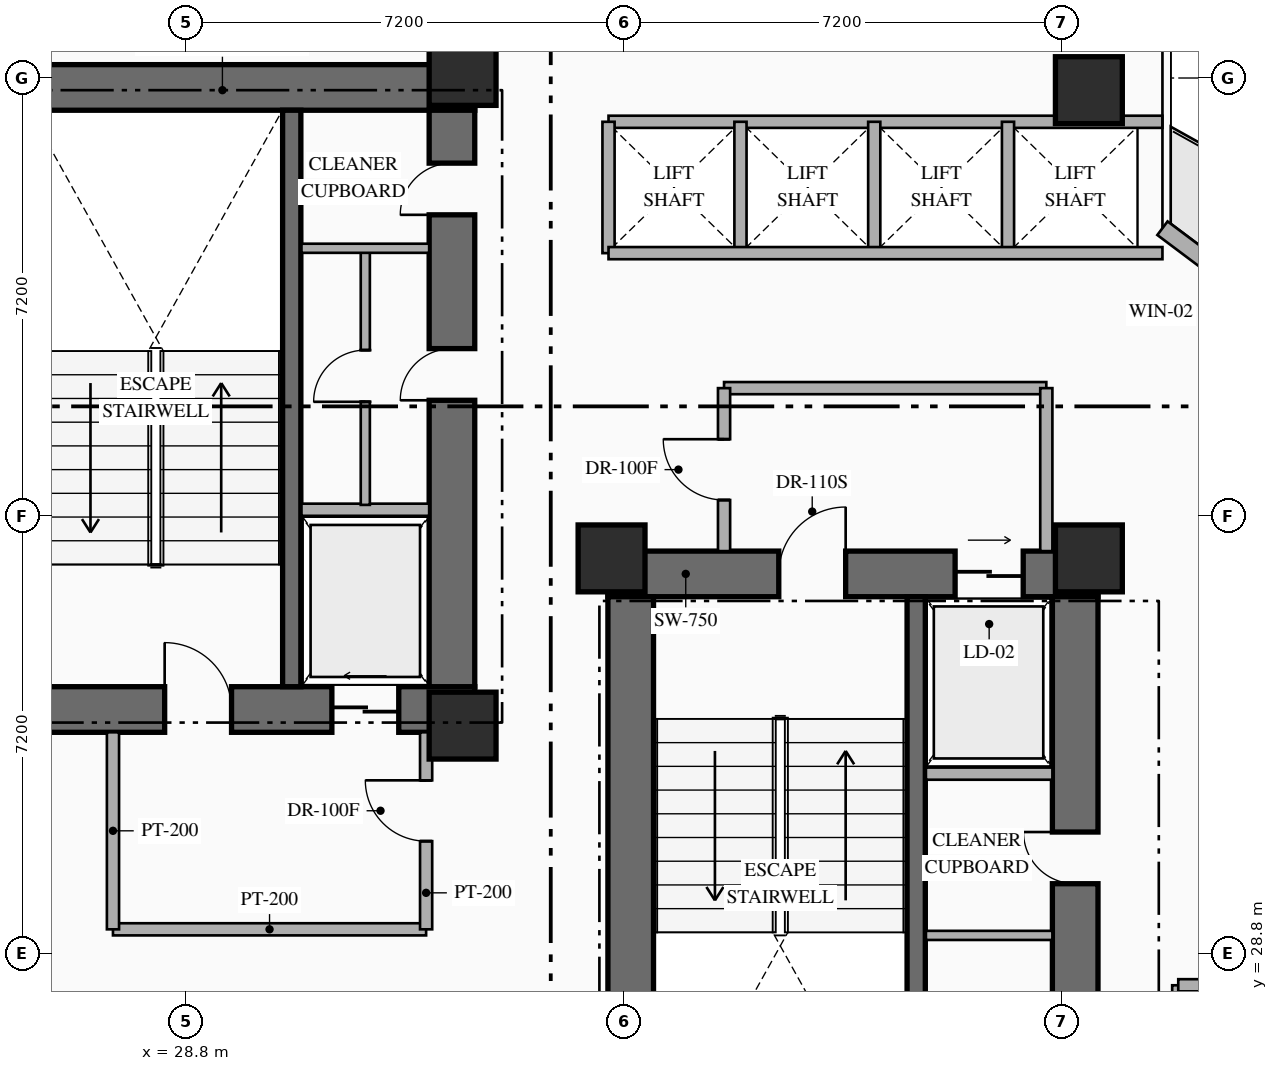
"""IFC4 building model, lengths in metres.
Left out: names, types, materials, properties, quantities, classifications, styles, units other than length and angle.
Written with IfcOpenShell. Run it as: python <this file> out.ifc"""

import sys

from ifc_helpers import new_model, si_unit, direction, frame, frame_2d, origin, origin_2d, place, context, subcontext, project, spatial, rectangle, extrude, element, fill, save


model = new_model("IFC4")
c1 = context("Model", 3, precision=1e-05, world=origin(), true_north=direction((0.0, 1.0)))
c2 = subcontext(c1, "Body", "Model", "MODEL_VIEW")
j1 = project(units=[si_unit("LENGTHUNIT", "METRE"), si_unit("PLANEANGLEUNIT", "RADIAN")], contexts=[c1])
p1 = place(None, origin())
s1 = spatial("IfcSite", under=j1, at=p1, CompositionType="ELEMENT")
p2 = place(p1, origin())
s2 = spatial("IfcBuilding", under=s1, at=p2, CompositionType="ELEMENT")
p3 = place(p2, frame((0.0, 0.0, 84.65)))
s3 = spatial("IfcBuildingStorey", under=s2, at=p3, CompositionType="ELEMENT", Elevation=84.65)
p4 = place(p3, frame((25.47, 32.815, 0.0), z_axis=(0.0, 0.0, 1.0), x_axis=(1.0, 0.0, 0.0)))
e1 = element("IfcWall", 1, at=p4, inside=s3, PredefinedType="SHEAR", context=c2, shape_type="SweptSolid", body=[
    extrude(rectangle(XDim=8.08, YDim=0.75, at=frame_2d((4.04, 0.0))), origin(), (0.0, 0.0, 1.0), 3.35),
])
p5 = place(p4, frame((2.98, 0.0, 0.0)))
e2 = element("IfcOpeningElement", 2, at=p5, cuts=e1, PredefinedType="OPENING", context=c2, shape_type="SweptSolid", body=[
    extrude(rectangle(XDim=1.1, YDim=2.2, at=frame_2d((0.55, 1.1))), frame((0.0, 0.385, 0.0), z_axis=(0.0, -1.0, 0.0), x_axis=(1.0, 0.0, 0.0)), (0.0, 0.0, 1.0), 0.77),
])
p6 = place(p4, frame((5.73, 0.0, 0.0)))
e3 = element("IfcOpeningElement", 3, at=p6, cuts=e1, PredefinedType="OPENING", context=c2, shape_type="SweptSolid", body=[
    extrude(rectangle(XDim=1.1, YDim=2.15, at=frame_2d((0.55, 1.075))), frame((0.0, 0.385, 0.0), z_axis=(0.0, -1.0, 0.0), x_axis=(1.0, 0.0, 0.0)), (0.0, 0.0, 1.0), 0.77),
])
p7 = place(p3, frame((25.47, 43.045, 0.0), z_axis=(0.0, 0.0, 1.0), x_axis=(1.0, 0.0, 0.0)))
e4 = element("IfcWall", 4, at=p7, inside=s3, PredefinedType="SHEAR", context=c2, shape_type="SweptSolid", body=[
    extrude(rectangle(XDim=8.08, YDim=0.75, at=frame_2d((4.04, 0.0))), origin(), (0.0, 0.0, 1.0), 3.35),
])
p8 = place(p3, frame((33.175, 33.19, 0.0), z_axis=(0.0, 0.0, 1.0), x_axis=(0.0, 1.0, 0.0)))
e5 = element("IfcWall", 5, at=p8, inside=s3, PredefinedType="SHEAR", context=c2, shape_type="SweptSolid", body=[
    extrude(rectangle(XDim=9.48, YDim=0.75, at=frame_2d((4.74, 0.0))), origin(), (0.0, 0.0, 1.0), 3.35),
])
p9 = place(p8, frame((4.71, 0.0, 0.0)))
e6 = element("IfcOpeningElement", 6, at=p9, cuts=e5, PredefinedType="OPENING", context=c2, shape_type="SweptSolid", body=[
    extrude(rectangle(XDim=0.85, YDim=2.08, at=frame_2d((0.425, 1.04))), frame((0.0, 0.385, 0.0), z_axis=(0.0, -1.0, 0.0), x_axis=(1.0, 0.0, 0.0)), (0.0, 0.0, 1.0), 0.77),
])
p10 = place(p8, frame((7.76, 0.0, 0.0)))
e7 = element("IfcOpeningElement", 7, at=p10, cuts=e5, PredefinedType="OPENING", context=c2, shape_type="SweptSolid", body=[
    extrude(rectangle(XDim=0.85, YDim=2.08, at=frame_2d((0.425, 1.04))), frame((0.0, 0.385, 0.0), z_axis=(0.0, -1.0, 0.0), x_axis=(1.0, 0.0, 0.0)), (0.0, 0.0, 1.0), 0.77),
])
p11 = place(p3, frame((30.54, 33.19, 0.0), z_axis=(0.0, 0.0, 1.0), x_axis=(0.0, 1.0, 0.0)))
e8 = element("IfcWall", 8, at=p11, inside=s3, PredefinedType="SHEAR", context=c2, shape_type="SweptSolid", body=[
    extrude(rectangle(XDim=9.48, YDim=0.3, at=frame_2d((4.74, 0.0))), origin(), (0.0, 0.0, 1.0), 3.35),
])
p12 = place(p3, frame((35.74, 35.045, 0.0), z_axis=(0.0, 0.0, 1.0), x_axis=(1.0, 0.0, 0.0)))
e9 = element("IfcWall", 9, at=p12, inside=s3, PredefinedType="SHEAR", context=c2, shape_type="SweptSolid", body=[
    extrude(rectangle(XDim=8.06, YDim=0.75, at=frame_2d((4.03, 0.0))), origin(), (0.0, 0.0, 1.0), 3.35),
])
p13 = place(p12, frame((2.81, 0.0, 0.0)))
e10 = element("IfcOpeningElement", 10, at=p13, cuts=e9, PredefinedType="OPENING", context=c2, shape_type="SweptSolid", body=[
    extrude(rectangle(XDim=1.1, YDim=2.2, at=frame_2d((0.55, 1.1))), frame((0.0, 0.385, 0.0), z_axis=(0.0, -1.0, 0.0), x_axis=(1.0, 0.0, 0.0)), (0.0, 0.0, 1.0), 0.77),
])
p14 = place(p12, frame((5.71, 0.0, 0.0)))
e11 = element("IfcOpeningElement", 11, at=p14, cuts=e9, PredefinedType="OPENING", context=c2, shape_type="SweptSolid", body=[
    extrude(rectangle(XDim=1.12, YDim=2.15, at=frame_2d((0.56, 1.075))), frame((0.0, 0.385, 0.0), z_axis=(0.0, -1.0, 0.0), x_axis=(1.0, 0.0, 0.0)), (0.0, 0.0, 1.0), 0.77),
])
p15 = place(p3, frame((36.115, 25.19, 0.0), z_axis=(0.0, 0.0, 1.0), x_axis=(0.0, 1.0, 0.0)))
e12 = element("IfcWall", 12, at=p15, inside=s3, PredefinedType="SHEAR", context=c2, shape_type="SweptSolid", body=[
    extrude(rectangle(XDim=9.48, YDim=0.75, at=frame_2d((4.74, 0.0))), origin(), (0.0, 0.0, 1.0), 3.35),
])
p16 = place(p3, frame((43.425, 25.19, 0.0), z_axis=(0.0, 0.0, 1.0), x_axis=(0.0, 1.0, 0.0)))
e13 = element("IfcWall", 13, at=p16, inside=s3, PredefinedType="SHEAR", context=c2, shape_type="SweptSolid", body=[
    extrude(rectangle(XDim=9.48, YDim=0.75, at=frame_2d((4.74, 0.0))), origin(), (0.0, 0.0, 1.0), 3.35),
])
p17 = place(p16, frame((1.51, 0.0, 0.0)))
e14 = element("IfcOpeningElement", 14, at=p17, cuts=e13, PredefinedType="OPENING", context=c2, shape_type="SweptSolid", body=[
    extrude(rectangle(XDim=0.85, YDim=2.08, at=frame_2d((0.425, 1.04))), frame((0.0, 0.385, 0.0), z_axis=(0.0, -1.0, 0.0), x_axis=(1.0, 0.0, 0.0)), (0.0, 0.0, 1.0), 0.77),
])
p18 = place(p16, frame((4.76, 0.0, 0.0)))
e15 = element("IfcOpeningElement", 15, at=p18, cuts=e13, PredefinedType="OPENING", context=c2, shape_type="SweptSolid", body=[
    extrude(rectangle(XDim=0.85, YDim=2.08, at=frame_2d((0.425, 1.04))), frame((0.0, 0.385, 0.0), z_axis=(0.0, -1.0, 0.0), x_axis=(1.0, 0.0, 0.0)), (0.0, 0.0, 1.0), 0.77),
])
p19 = place(p3, frame((40.81, 25.19, 0.0), z_axis=(0.0, 0.0, 1.0), x_axis=(0.0, 1.0, 0.0)))
e16 = element("IfcWall", 16, at=p19, inside=s3, PredefinedType="SHEAR", context=c2, shape_type="SweptSolid", body=[
    extrude(rectangle(XDim=9.48, YDim=0.3, at=frame_2d((4.74, 0.0))), origin(), (0.0, 0.0, 1.0), 3.35),
])
for number, where, z_axis, x_axis in (
    (17, (33.35, 32.55, 0.0), (0.0, 0.0, 1.0), (1.0, 0.0, 0.0)),
    (18, (33.35, 43.3, 0.0), (0.0, 0.0, 1.0), (1.0, 0.0, 0.0)),
    (19, (35.8, 35.3, 0.0), (0.0, 0.0, 1.0), (1.0, 0.0, 0.0)),
    (20, (43.65, 35.3, 0.0), (0.0, 0.0, 1.0), (1.0, 0.0, 0.0)),
    (21, (43.65, 43.0, 0.0), (0.0, 0.0, 1.0), (1.0, 0.0, 0.0)),
):
    element("IfcColumn", number, at=place(p3, frame(where, z_axis=z_axis, x_axis=x_axis)), inside=s3, PredefinedType="COLUMN", context=c2, shape_type="SweptSolid", body=[
        extrude(rectangle(XDim=1.1, YDim=1.1, at=origin_2d()), origin(), (0.0, 0.0, 1.0), 3.35),
    ])
p20 = place(p3, frame((44.86, 40.73, 0.0), z_axis=(0.0, 0.0, 1.0), x_axis=(0.800006902154, -0.599990797017, 0.0)))
e22 = element("IfcWall", 22, at=p20, inside=s3, PredefinedType="STANDARD", context=c2, shape_type="SweptSolid", body=[
    extrude(rectangle(XDim=29.712, YDim=0.28, at=frame_2d((14.856, 0.0))), origin(), (0.0, 0.0, 1.0), 3.13),
])
p21 = place(p20, frame((14.249, 0.0, 0.0)))
e23 = element("IfcOpeningElement", 23, at=p21, cuts=e22, PredefinedType="OPENING", context=c2, shape_type="SweptSolid", body=[
    extrude(rectangle(XDim=1.1, YDim=2.2, at=frame_2d((0.55, 1.1))), frame((0.0, 0.15, 0.0), z_axis=(0.0, -1.0, 0.0), x_axis=(1.0, 0.0, 0.0)), (0.0, 0.0, 1.0), 0.3),
])
p22 = place(p20, frame((1.612, 0.0, 0.85)))
e24 = element("IfcOpeningElement", 24, at=p22, cuts=e22, PredefinedType="OPENING", context=c2, shape_type="SweptSolid", body=[
    extrude(rectangle(XDim=1.4, YDim=1.8, at=frame_2d((0.7, 0.9))), frame((0.0, 0.15, 0.0), z_axis=(0.0, -1.0, 0.0), x_axis=(1.0, 0.0, 0.0)), (0.0, 0.0, 1.0), 0.3),
])
p23 = place(p20, frame((5.667, 0.0, 0.85)))
e25 = element("IfcOpeningElement", 25, at=p23, cuts=e22, PredefinedType="OPENING", context=c2, shape_type="SweptSolid", body=[
    extrude(rectangle(XDim=1.4, YDim=1.8, at=frame_2d((0.7, 0.9))), frame((0.0, 0.15, 0.0), z_axis=(0.0, -1.0, 0.0), x_axis=(1.0, 0.0, 0.0)), (0.0, 0.0, 1.0), 0.3),
])
p24 = place(p20, frame((9.912, 0.0, 0.85)))
e26 = element("IfcOpeningElement", 26, at=p24, cuts=e22, PredefinedType="OPENING", context=c2, shape_type="SweptSolid", body=[
    extrude(rectangle(XDim=1.4, YDim=1.8, at=frame_2d((0.7, 0.9))), frame((0.0, 0.15, 0.0), z_axis=(0.0, -1.0, 0.0), x_axis=(1.0, 0.0, 0.0)), (0.0, 0.0, 1.0), 0.3),
])
p25 = place(p20, frame((19.743, 0.0, 0.85)))
e27 = element("IfcOpeningElement", 27, at=p25, cuts=e22, PredefinedType="OPENING", context=c2, shape_type="SweptSolid", body=[
    extrude(rectangle(XDim=1.4, YDim=1.8, at=frame_2d((0.7, 0.9))), frame((0.0, 0.15, 0.0), z_axis=(0.0, -1.0, 0.0), x_axis=(1.0, 0.0, 0.0)), (0.0, 0.0, 1.0), 0.3),
])
p26 = place(p20, frame((22.645, 0.0, 0.85)))
e28 = element("IfcOpeningElement", 28, at=p26, cuts=e22, PredefinedType="OPENING", context=c2, shape_type="SweptSolid", body=[
    extrude(rectangle(XDim=1.4, YDim=1.8, at=frame_2d((0.7, 0.9))), frame((0.0, 0.15, 0.0), z_axis=(0.0, -1.0, 0.0), x_axis=(1.0, 0.0, 0.0)), (0.0, 0.0, 1.0), 0.3),
])
p27 = place(p20, frame((26.7, 0.0, 0.85)))
e29 = element("IfcOpeningElement", 29, at=p27, cuts=e22, PredefinedType="OPENING", context=c2, shape_type="SweptSolid", body=[
    extrude(rectangle(XDim=1.4, YDim=1.8, at=frame_2d((0.7, 0.9))), frame((0.0, 0.15, 0.0), z_axis=(0.0, -1.0, 0.0), x_axis=(1.0, 0.0, 0.0)), (0.0, 0.0, 1.0), 0.3),
])
p28 = place(p3, frame((30.7, 36.1, 0.0), z_axis=(0.0, 0.0, 1.0), x_axis=(1.0, 0.0, 0.0)))
e30 = element("IfcWall", 30, at=p28, inside=s3, PredefinedType="STANDARD", context=c2, shape_type="SweptSolid", body=[
    extrude(rectangle(XDim=2.1, YDim=0.2, at=frame_2d((1.05, 0.0))), origin(), (0.0, 0.0, 1.0), 3.13),
])
p29 = place(p3, frame((31.75, 36.18, 0.0), z_axis=(0.0, 0.0, 1.0), x_axis=(0.0, 1.0, 0.0)))
e31 = element("IfcWall", 31, at=p29, inside=s3, PredefinedType="PARTITIONING", context=c2, shape_type="SweptSolid", body=[
    extrude(rectangle(XDim=4.24, YDim=0.15, at=frame_2d((2.12, 0.0))), origin(), (0.0, 0.0, 1.0), 3.13),
])
p30 = place(p29, frame((1.695, 0.0, 0.0)))
e32 = element("IfcOpeningElement", 32, at=p30, cuts=e31, PredefinedType="OPENING", context=c2, shape_type="SweptSolid", body=[
    extrude(rectangle(XDim=0.85, YDim=2.08, at=frame_2d((0.425, 1.04))), frame((0.0, 0.085, 0.0), z_axis=(0.0, -1.0, 0.0), x_axis=(1.0, 0.0, 0.0)), (0.0, 0.0, 1.0), 0.17),
])
p31 = place(p3, frame((30.7, 40.4, 0.0), z_axis=(0.0, 0.0, 1.0), x_axis=(1.0, 0.0, 0.0)))
e33 = element("IfcWall", 33, at=p31, inside=s3, PredefinedType="PARTITIONING", context=c2, shape_type="SweptSolid", body=[
    extrude(rectangle(XDim=2.1, YDim=0.15, at=frame_2d((1.05, 0.0))), origin(), (0.0, 0.0, 1.0), 3.13),
])
p32 = place(p3, frame((40.97, 31.76, 0.0), z_axis=(0.0, 0.0, 1.0), x_axis=(1.0, 0.0, 0.0)))
e34 = element("IfcWall", 34, at=p32, inside=s3, PredefinedType="STANDARD", context=c2, shape_type="SweptSolid", body=[
    extrude(rectangle(XDim=2.08, YDim=0.2, at=frame_2d((1.04, 0.0))), origin(), (0.0, 0.0, 1.0), 3.13),
])
p33 = place(p3, frame((40.97, 29.1, 0.0), z_axis=(0.0, 0.0, 1.0), x_axis=(1.0, 0.0, 0.0)))
e35 = element("IfcWall", 35, at=p33, inside=s3, PredefinedType="PARTITIONING", context=c2, shape_type="SweptSolid", body=[
    extrude(rectangle(XDim=2.08, YDim=0.15, at=frame_2d((1.04, 0.0))), origin(), (0.0, 0.0, 1.0), 3.13),
])
p34 = place(p3, frame((27.6, 29.2, 0.0), z_axis=(0.0, 0.0, 1.0), x_axis=(1.0, 0.0, 0.0)))
e36 = element("IfcWall", 36, at=p34, inside=s3, PredefinedType="STANDARD", context=c2, shape_type="SweptSolid", body=[
    extrude(rectangle(XDim=5.15, YDim=0.2, at=frame_2d((2.575, 0.0))), origin(), (0.0, 0.0, 1.0), 3.13),
])
p35 = place(p3, frame((27.6, 29.2, 0.0), z_axis=(0.0, 0.0, 1.0), x_axis=(0.0, 1.0, 0.0)))
e37 = element("IfcWall", 37, at=p35, inside=s3, PredefinedType="STANDARD", context=c2, shape_type="SweptSolid", body=[
    extrude(rectangle(XDim=3.24, YDim=0.2, at=frame_2d((1.62, 0.0))), origin(), (0.0, 0.0, 1.0), 3.13),
])
p36 = place(p3, frame((32.75, 29.2, 0.0), z_axis=(0.0, 0.0, 1.0), x_axis=(0.0, 1.0, 0.0)))
e38 = element("IfcWall", 38, at=p36, inside=s3, PredefinedType="STANDARD", context=c2, shape_type="SweptSolid", body=[
    extrude(rectangle(XDim=3.24, YDim=0.2, at=frame_2d((1.62, 0.0))), origin(), (0.0, 0.0, 1.0), 3.13),
])
p37 = place(p36, frame((1.45, 0.0, 0.0)))
e39 = element("IfcOpeningElement", 39, at=p37, cuts=e38, PredefinedType="OPENING", context=c2, shape_type="SweptSolid", body=[
    extrude(rectangle(XDim=1.0, YDim=2.2, at=frame_2d((0.5, 1.1))), frame((0.0, 0.11, 0.0), z_axis=(0.0, -1.0, 0.0), x_axis=(1.0, 0.0, 0.0)), (0.0, 0.0, 1.0), 0.22),
])
p38 = place(p3, frame((37.65, 38.1, 0.0), z_axis=(0.0, 0.0, 1.0), x_axis=(1.0, 0.0, 0.0)))
e40 = element("IfcWall", 40, at=p38, inside=s3, PredefinedType="STANDARD", context=c2, shape_type="SweptSolid", body=[
    extrude(rectangle(XDim=5.3, YDim=0.2, at=frame_2d((2.65, 0.0))), origin(), (0.0, 0.0, 1.0), 3.13),
])
p39 = place(p3, frame((42.95, 35.42, 0.0), z_axis=(0.0, 0.0, 1.0), x_axis=(0.0, 1.0, 0.0)))
e41 = element("IfcWall", 41, at=p39, inside=s3, PredefinedType="STANDARD", context=c2, shape_type="SweptSolid", body=[
    extrude(rectangle(XDim=2.68, YDim=0.2, at=frame_2d((1.34, 0.0))), origin(), (0.0, 0.0, 1.0), 3.13),
])
p40 = place(p3, frame((37.65, 35.42, 0.0), z_axis=(0.0, 0.0, 1.0), x_axis=(0.0, 1.0, 0.0)))
e42 = element("IfcWall", 42, at=p40, inside=s3, PredefinedType="STANDARD", context=c2, shape_type="SweptSolid", body=[
    extrude(rectangle(XDim=2.68, YDim=0.2, at=frame_2d((1.34, 0.0))), origin(), (0.0, 0.0, 1.0), 3.13),
])
p41 = place(p40, frame((0.84, 0.0, 0.0)))
e43 = element("IfcOpeningElement", 43, at=p41, cuts=e42, PredefinedType="OPENING", context=c2, shape_type="SweptSolid", body=[
    extrude(rectangle(XDim=1.0, YDim=2.2, at=frame_2d((0.5, 1.1))), frame((0.0, 0.11, 0.0), z_axis=(0.0, -1.0, 0.0), x_axis=(1.0, 0.0, 0.0)), (0.0, 0.0, 1.0), 0.22),
])
p42 = place(p3, frame((35.75, 42.48, 0.0), z_axis=(0.0, 0.0, 1.0), x_axis=(1.0, 0.0, 0.0)))
e44 = element("IfcWall", 44, at=p42, inside=s3, PredefinedType="STANDARD", context=c2, shape_type="SweptSolid", body=[
    extrude(rectangle(XDim=9.11, YDim=0.2, at=frame_2d((4.555, 0.0))), origin(), (0.0, 0.0, 1.0), 3.13),
])
for number, where, z_axis, x_axis in (
    (45, (35.75, 40.32, 0.0), (0.0, 0.0, 1.0), (0.0, 1.0, 0.0)),
    (46, (37.92, 40.32, 0.0), (0.0, 0.0, 1.0), (0.0, 1.0, 0.0)),
    (47, (40.12, 40.32, 0.0), (0.0, 0.0, 1.0), (0.0, 1.0, 0.0)),
    (48, (42.32, 40.32, 0.0), (0.0, 0.0, 1.0), (0.0, 1.0, 0.0)),
):
    element("IfcWall", number, at=place(p3, frame(where, z_axis=z_axis, x_axis=x_axis)), inside=s3, PredefinedType="STANDARD", context=c2, shape_type="SweptSolid", body=[
        extrude(rectangle(XDim=2.16, YDim=0.2, at=frame_2d((1.08, 0.0))), origin(), (0.0, 0.0, 1.0), 3.13),
    ])
p43 = place(p3, frame((35.75, 40.32, 0.0), z_axis=(0.0, 0.0, 1.0), x_axis=(1.0, 0.0, 0.0)))
e49 = element("IfcWall", 49, at=p43, inside=s3, PredefinedType="STANDARD", context=c2, shape_type="SweptSolid", body=[
    extrude(rectangle(XDim=9.11, YDim=0.2, at=frame_2d((4.555, 0.0))), origin(), (0.0, 0.0, 1.0), 3.13),
])
p44 = place(p3, frame((45.12, 26.12, 0.0), z_axis=(0.0, 0.0, 1.0), x_axis=(0.0, 1.0, 0.0)))
e50 = element("IfcWall", 50, at=p44, inside=s3, PredefinedType="STANDARD", context=c2, shape_type="SweptSolid", body=[
    extrude(rectangle(XDim=2.16, YDim=0.2, at=frame_2d((1.08, 0.0))), origin(), (0.0, 0.0, 1.0), 3.13),
])
p45 = place(p3, frame((45.12, 28.28, 0.0), z_axis=(0.0, 0.0, 1.0), x_axis=(1.0, 0.0, 0.0)))
e51 = element("IfcWall", 51, at=p45, inside=s3, PredefinedType="STANDARD", context=c2, shape_type="SweptSolid", body=[
    extrude(rectangle(XDim=4.4, YDim=0.2, at=frame_2d((2.2, 0.0))), origin(), (0.0, 0.0, 1.0), 3.13),
])
p46 = place(p45, frame((0.56, 0.0, 0.0)))
e52 = element("IfcOpeningElement", 52, at=p46, cuts=e51, PredefinedType="OPENING", context=c2, shape_type="SweptSolid", body=[
    extrude(rectangle(XDim=1.08, YDim=2.15, at=frame_2d((0.54, 1.075))), frame((0.0, 0.11, 0.0), z_axis=(0.0, -1.0, 0.0), x_axis=(1.0, 0.0, 0.0)), (0.0, 0.0, 1.0), 0.22),
])
p47 = place(p45, frame((2.76, 0.0, 0.0)))
e53 = element("IfcOpeningElement", 53, at=p47, cuts=e51, PredefinedType="OPENING", context=c2, shape_type="SweptSolid", body=[
    extrude(rectangle(XDim=1.08, YDim=2.15, at=frame_2d((0.54, 1.075))), frame((0.0, 0.11, 0.0), z_axis=(0.0, -1.0, 0.0), x_axis=(1.0, 0.0, 0.0)), (0.0, 0.0, 1.0), 0.22),
])
p48 = place(p5, origin())
e54 = element("IfcDoor", 54, at=p48, inside=s3, OperationType="SINGLE_SWING_LEFT", PredefinedType="DOOR", context=c2, shape_type="SweptSolid", body=[
    extrude(rectangle(XDim=1.1, YDim=2.2, at=frame_2d((0.55, 1.1))), frame((0.0, 0.025, 0.0), z_axis=(0.0, -1.0, 0.0), x_axis=(1.0, 0.0, 0.0)), (0.0, 0.0, 1.0), 0.05),
])
fill(e2, e54)
p49 = place(p6, origin())
e55 = element("IfcDoor", 55, at=p49, inside=s3, OperationType="SLIDING_TO_LEFT", PredefinedType="USERDEFINED", context=c2, shape_type="SweptSolid", body=[
    extrude(rectangle(XDim=1.1, YDim=2.15, at=frame_2d((0.55, 1.075))), frame((0.0, 0.025, 0.0), z_axis=(0.0, -1.0, 0.0), x_axis=(1.0, 0.0, 0.0)), (0.0, 0.0, 1.0), 0.05),
])
fill(e3, e55)
p50 = place(p13, origin())
e56 = element("IfcDoor", 56, at=p50, inside=s3, OperationType="SINGLE_SWING_RIGHT", PredefinedType="DOOR", context=c2, shape_type="SweptSolid", body=[
    extrude(rectangle(XDim=1.1, YDim=2.2, at=frame_2d((0.55, 1.1))), frame((0.0, 0.025, 0.0), z_axis=(0.0, -1.0, 0.0), x_axis=(1.0, 0.0, 0.0)), (0.0, 0.0, 1.0), 0.05),
])
fill(e10, e56)
p51 = place(p14, origin())
e57 = element("IfcDoor", 57, at=p51, inside=s3, OperationType="SLIDING_TO_RIGHT", PredefinedType="USERDEFINED", context=c2, shape_type="SweptSolid", body=[
    extrude(rectangle(XDim=1.12, YDim=2.15, at=frame_2d((0.56, 1.075))), frame((0.0, 0.025, 0.0), z_axis=(0.0, -1.0, 0.0), x_axis=(1.0, 0.0, 0.0)), (0.0, 0.0, 1.0), 0.05),
])
fill(e11, e57)
p52 = place(p9, origin())
e58 = element("IfcDoor", 58, at=p52, inside=s3, OperationType="SINGLE_SWING_LEFT", PredefinedType="DOOR", context=c2, shape_type="SweptSolid", body=[
    extrude(rectangle(XDim=0.85, YDim=2.08, at=frame_2d((0.425, 1.04))), frame((0.0, 0.025, 0.0), z_axis=(0.0, -1.0, 0.0), x_axis=(1.0, 0.0, 0.0)), (0.0, 0.0, 1.0), 0.05),
])
fill(e6, e58)
p53 = place(p10, origin())
e59 = element("IfcDoor", 59, at=p53, inside=s3, OperationType="SINGLE_SWING_LEFT", PredefinedType="DOOR", context=c2, shape_type="SweptSolid", body=[
    extrude(rectangle(XDim=0.85, YDim=2.08, at=frame_2d((0.425, 1.04))), frame((0.0, 0.025, 0.0), z_axis=(0.0, -1.0, 0.0), x_axis=(1.0, 0.0, 0.0)), (0.0, 0.0, 1.0), 0.05),
])
fill(e7, e59)
p54 = place(p18, origin())
e60 = element("IfcDoor", 60, at=p54, inside=s3, OperationType="SINGLE_SWING_RIGHT", PredefinedType="DOOR", context=c2, shape_type="SweptSolid", body=[
    extrude(rectangle(XDim=0.85, YDim=2.08, at=frame_2d((0.425, 1.04))), frame((0.0, 0.025, 0.0), z_axis=(0.0, -1.0, 0.0), x_axis=(1.0, 0.0, 0.0)), (0.0, 0.0, 1.0), 0.05),
])
fill(e15, e60)
p55 = place(p30, origin())
e61 = element("IfcDoor", 61, at=p55, inside=s3, OperationType="SINGLE_SWING_LEFT", PredefinedType="DOOR", context=c2, shape_type="SweptSolid", body=[
    extrude(rectangle(XDim=0.85, YDim=2.08, at=frame_2d((0.425, 1.04))), frame((0.0, 0.025, 0.0), z_axis=(0.0, -1.0, 0.0), x_axis=(1.0, 0.0, 0.0)), (0.0, 0.0, 1.0), 0.05),
])
fill(e32, e61)
p56 = place(p37, origin())
e62 = element("IfcDoor", 62, at=p56, inside=s3, OperationType="SINGLE_SWING_RIGHT", PredefinedType="DOOR", context=c2, shape_type="SweptSolid", body=[
    extrude(rectangle(XDim=1.0, YDim=2.2, at=frame_2d((0.5, 1.1))), frame((0.0, 0.025, 0.0), z_axis=(0.0, -1.0, 0.0), x_axis=(1.0, 0.0, 0.0)), (0.0, 0.0, 1.0), 0.05),
])
fill(e39, e62)
p57 = place(p41, origin())
e63 = element("IfcDoor", 63, at=p57, inside=s3, OperationType="SINGLE_SWING_RIGHT", PredefinedType="DOOR", context=c2, shape_type="SweptSolid", body=[
    extrude(rectangle(XDim=1.0, YDim=2.2, at=frame_2d((0.5, 1.1))), frame((0.0, 0.025, 0.0), z_axis=(0.0, -1.0, 0.0), x_axis=(1.0, 0.0, 0.0)), (0.0, 0.0, 1.0), 0.05),
])
fill(e43, e63)
save(model, sys.argv[1])
